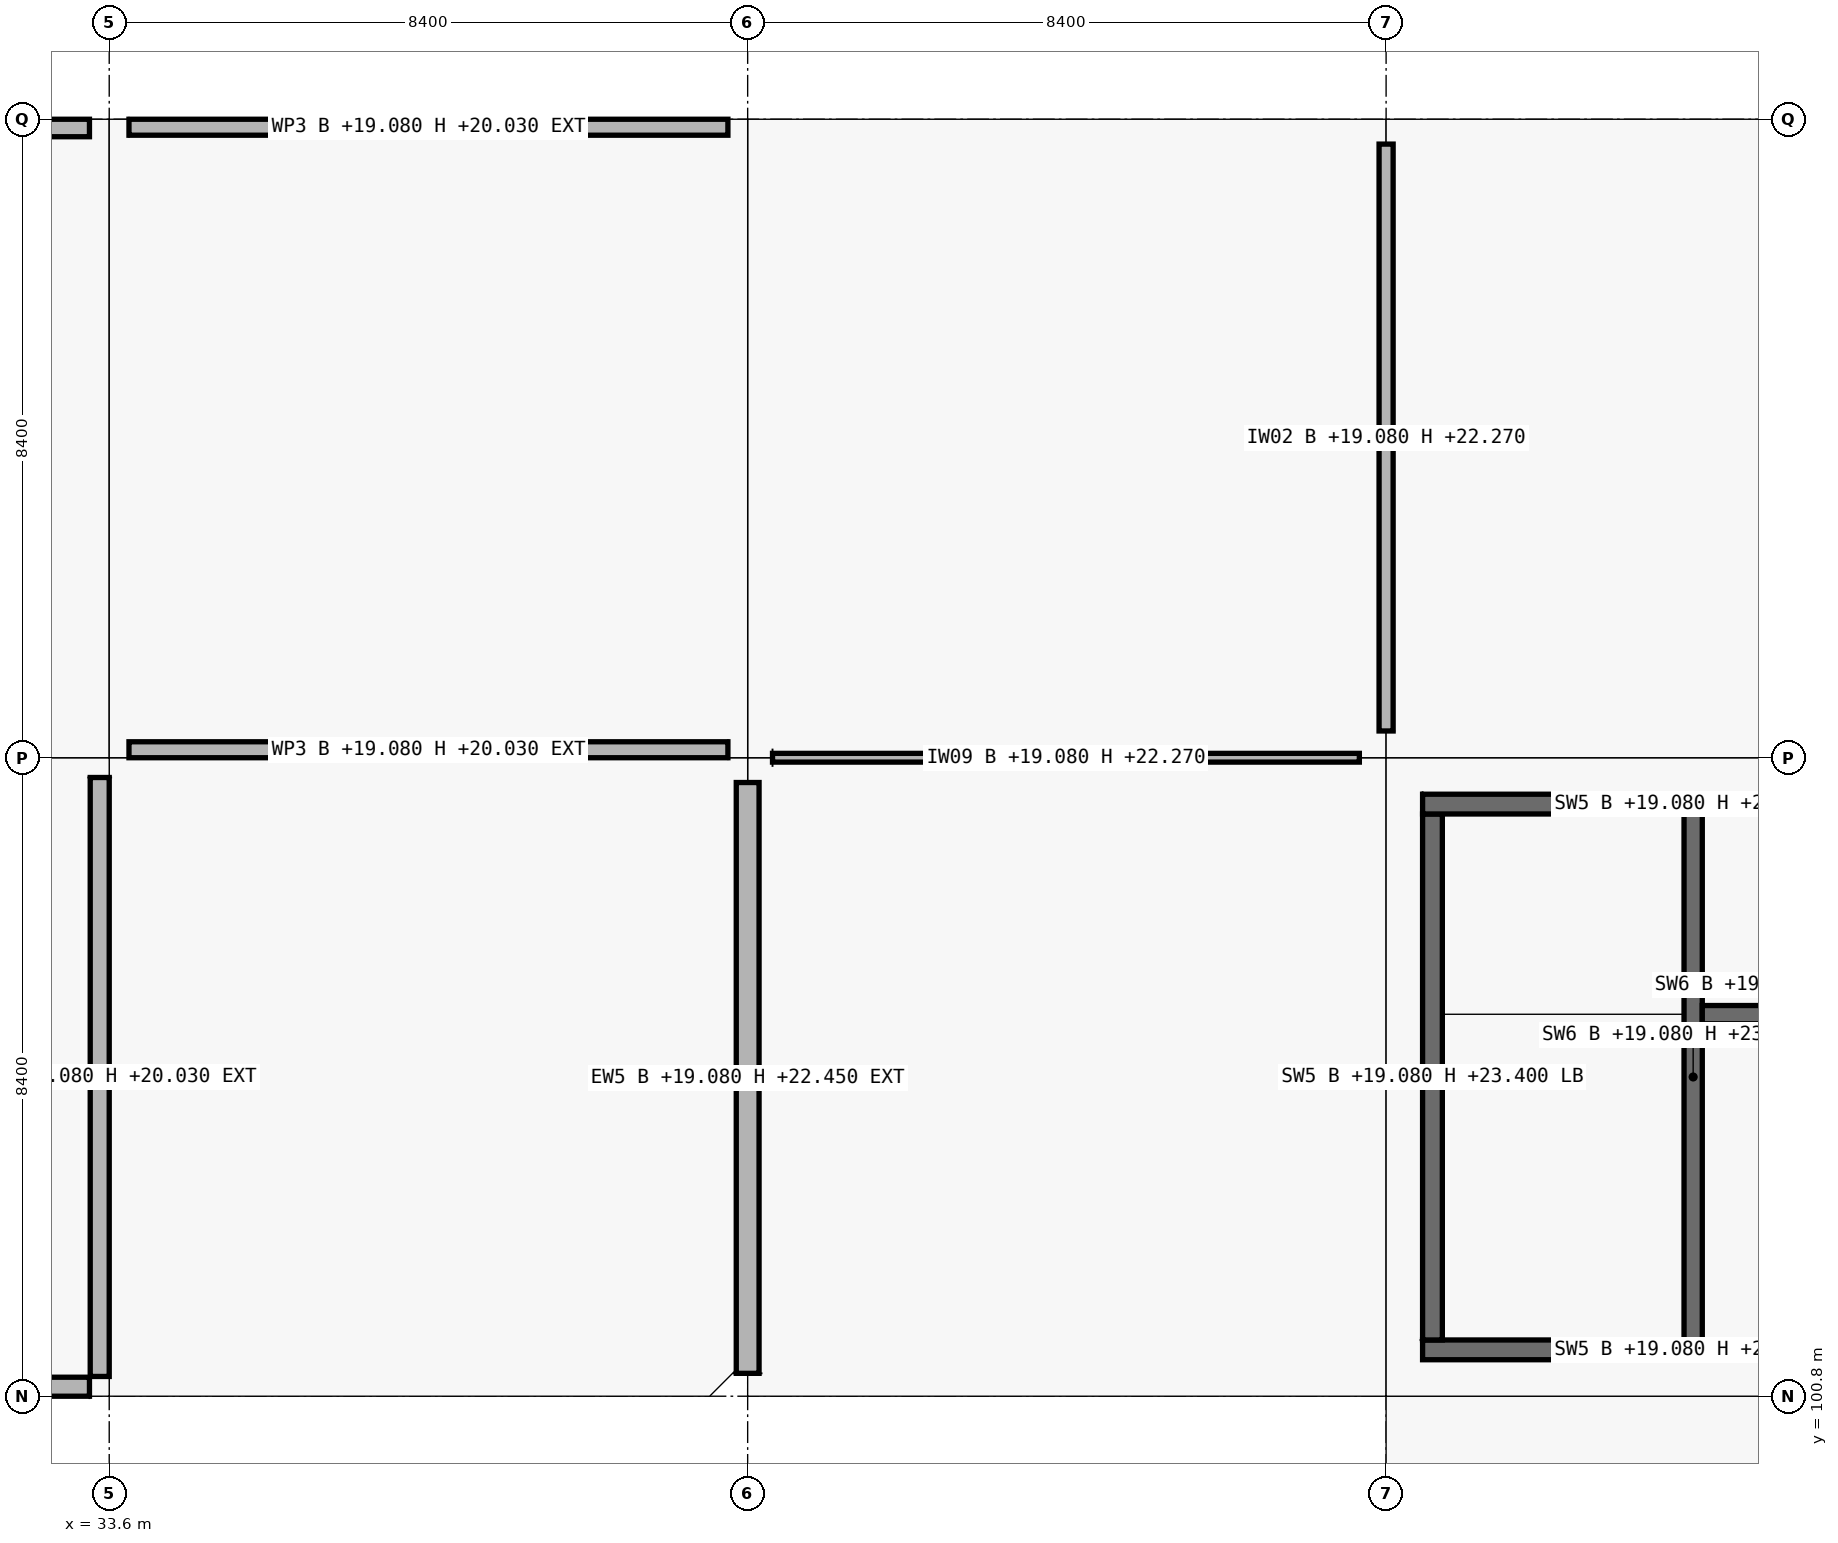
"""IFC4 building model, lengths in metres.
Left out: names, types, materials, properties, quantities, classifications, styles, units other than length and angle.
Written with IfcOpenShell. Run it as: python <this file> out.ifc"""

import sys

from ifc_helpers import new_model, si_unit, direction, frame, frame_2d, origin, origin_2d, place, context, subcontext, project, spatial, rectangle, extrude, element, fill, save


model = new_model("IFC4")
c1 = context("Model", 3, precision=1e-05, world=origin(), true_north=direction((0.0, 1.0)))
c2 = subcontext(c1, "Body", "Model", "MODEL_VIEW")
j1 = project(units=[si_unit("LENGTHUNIT", "METRE"), si_unit("PLANEANGLEUNIT", "RADIAN")], contexts=[c1])
p1 = place(None, origin())
s1 = spatial("IfcSite", under=j1, at=p1, CompositionType="ELEMENT")
p2 = place(p1, origin())
s2 = spatial("IfcBuilding", under=s1, at=p2, CompositionType="ELEMENT")
p3 = place(p2, frame((0.0, 0.0, 19.08)))
s3 = spatial("IfcBuildingStorey", under=s2, at=p3, CompositionType="ELEMENT", Elevation=19.08)
p4 = place(p3, frame((42.0, 100.8, 0.0), z_axis=(0.0, 0.0, 1.0), x_axis=(1.0, 0.0, 0.0)))
e1 = element("IfcColumn", 1, at=p4, inside=s3, PredefinedType="COLUMN", context=c2, shape_type="SweptSolid", body=[
    extrude(rectangle(XDim=0.6, YDim=0.6, at=origin_2d()), origin(), (0.0, 0.0, 1.0), 4.32),
])
p5 = place(p3, frame((42.0, 109.2, 0.0), z_axis=(0.0, 0.0, 1.0), x_axis=(1.0, 0.0, 0.0)))
e2 = element("IfcColumn", 2, at=p5, inside=s3, PredefinedType="COLUMN", context=c2, shape_type="SweptSolid", body=[
    extrude(rectangle(XDim=0.65, YDim=0.65, at=origin_2d()), origin(), (0.0, 0.0, 1.0), 4.32),
])
p6 = place(p3, frame((42.0, 117.6, 0.0), z_axis=(0.0, 0.0, 1.0), x_axis=(1.0, 0.0, 0.0)))
e3 = element("IfcColumn", 3, at=p6, inside=s3, PredefinedType="COLUMN", context=c2, shape_type="SweptSolid", body=[
    extrude(rectangle(XDim=0.6, YDim=0.6, at=origin_2d()), origin(), (0.0, 0.0, 1.0), 4.32),
])
p7 = place(p3, frame((50.4, 100.8, 0.0), z_axis=(0.0, 0.0, 1.0), x_axis=(1.0, 0.0, 0.0)))
e4 = element("IfcColumn", 4, at=p7, inside=s3, PredefinedType="COLUMN", context=c2, shape_type="SweptSolid", body=[
    extrude(rectangle(XDim=0.75, YDim=0.75, at=origin_2d()), origin(), (0.0, 0.0, 1.0), 4.32),
])
p8 = place(p3, frame((50.4, 109.2, 0.0), z_axis=(0.0, 0.0, 1.0), x_axis=(1.0, 0.0, 0.0)))
e5 = element("IfcColumn", 5, at=p8, inside=s3, PredefinedType="COLUMN", context=c2, shape_type="SweptSolid", body=[
    extrude(rectangle(XDim=0.7, YDim=0.7, at=origin_2d()), origin(), (0.0, 0.0, 1.0), 4.32),
])
p9 = place(p3, frame((50.4, 117.6, 0.0), z_axis=(0.0, 0.0, 1.0), x_axis=(1.0, 0.0, 0.0)))
e6 = element("IfcColumn", 6, at=p9, inside=s3, PredefinedType="COLUMN", context=c2, shape_type="SweptSolid", body=[
    extrude(rectangle(XDim=0.65, YDim=0.65, at=origin_2d()), origin(), (0.0, 0.0, 1.0), 4.32),
])
p10 = place(p3, frame((42.0, 101.101, 0.0), z_axis=(0.0, 0.0, 1.0), x_axis=(0.0, 1.0, 0.0)))
e7 = element("IfcWall", 7, at=p10, inside=s3, PredefinedType="SOLIDWALL", context=c2, shape_type="SweptSolid", body=[
    extrude(rectangle(XDim=7.773, YDim=0.3, at=frame_2d((3.886, 0.0))), origin(), (0.0, 0.0, 1.0), 3.37),
])
p11 = place(p10, frame((3.326, 0.0, 0.0)))
e8 = element("IfcOpeningElement", 8, at=p11, cuts=e7, PredefinedType="OPENING", context=c2, shape_type="SweptSolid", body=[
    extrude(rectangle(XDim=1.12, YDim=2.2, at=frame_2d((0.56, 1.1))), frame((0.0, 0.15, 0.0), z_axis=(0.0, -1.0, 0.0), x_axis=(1.0, 0.0, 0.0)), (0.0, 0.0, 1.0), 0.3),
])
p12 = place(p3, frame((33.34, 100.925, 0.0), z_axis=(0.0, 0.0, 1.0), x_axis=(-1.0, 0.0, 0.0)))
e9 = element("IfcWall", 9, at=p12, inside=s3, PredefinedType="PARAPET", context=c2, shape_type="SweptSolid", body=[
    extrude(rectangle(XDim=7.88, YDim=0.25, at=frame_2d((3.94, 0.0))), origin(), (0.0, 0.0, 1.0), 0.95),
])
p13 = place(p3, frame((33.475, 108.94, 0.0), z_axis=(0.0, 0.0, 1.0), x_axis=(0.0, -1.0, 0.0)))
e10 = element("IfcWall", 10, at=p13, inside=s3, PredefinedType="PARAPET", context=c2, shape_type="SweptSolid", body=[
    extrude(rectangle(XDim=7.88, YDim=0.25, at=frame_2d((3.94, 0.0))), origin(), (0.0, 0.0, 1.0), 0.95),
])
p14 = place(p3, frame((25.46, 117.485, 0.0), z_axis=(0.0, 0.0, 1.0), x_axis=(1.0, 0.0, 0.0)))
e11 = element("IfcWall", 11, at=p14, inside=s3, PredefinedType="PARAPET", context=c2, shape_type="SweptSolid", body=[
    extrude(rectangle(XDim=7.88, YDim=0.23, at=frame_2d((3.94, 0.0))), origin(), (0.0, 0.0, 1.0), 0.95),
])
for number, where, z_axis, x_axis in (
    (12, (41.74, 109.305, 0.0), (0.0, 0.0, 1.0), (-1.0, 0.0, 0.0)),
    (13, (33.86, 117.495, 0.0), (0.0, 0.0, 1.0), (1.0, 0.0, 0.0)),
):
    element("IfcWall", number, at=place(p3, frame(where, z_axis=z_axis, x_axis=x_axis)), inside=s3, PredefinedType="PARAPET", context=c2, shape_type="SweptSolid", body=[
        extrude(rectangle(XDim=7.88, YDim=0.21, at=frame_2d((3.94, 0.0))), origin(), (0.0, 0.0, 1.0), 0.95),
    ])
p15 = place(p3, frame((58.32, 101.41, 0.0), z_axis=(0.0, 0.0, 1.0), x_axis=(-1.0, 0.0, 0.0)))
e14 = element("IfcWall", 14, at=p15, inside=s3, PredefinedType="SHEAR", context=c2, shape_type="SweptSolid", body=[
    extrude(rectangle(XDim=7.44, YDim=0.26, at=frame_2d((3.72, 0.0))), origin(), (0.0, 0.0, 1.0), 4.32),
])
p16 = place(p15, frame((1.28, 0.0, 0.0)))
e15 = element("IfcOpeningElement", 15, at=p16, cuts=e14, PredefinedType="OPENING", context=c2, shape_type="SweptSolid", body=[
    extrude(rectangle(XDim=1.5, YDim=2.15, at=frame_2d((0.75, 1.075))), frame((0.0, 0.13, 0.0), z_axis=(0.0, -1.0, 0.0), x_axis=(1.0, 0.0, 0.0)), (0.0, 0.0, 1.0), 0.26),
])
p17 = place(p3, frame((51.01, 101.54, 0.0), z_axis=(0.0, 0.0, 1.0), x_axis=(0.0, 1.0, 0.0)))
e16 = element("IfcWall", 16, at=p17, inside=s3, PredefinedType="SHEAR", context=c2, shape_type="SweptSolid", body=[
    extrude(rectangle(XDim=6.92, YDim=0.26, at=frame_2d((3.46, 0.0))), origin(), (0.0, 0.0, 1.0), 4.32),
])
p18 = place(p3, frame((50.88, 108.59, 0.0), z_axis=(0.0, 0.0, 1.0), x_axis=(1.0, 0.0, 0.0)))
e17 = element("IfcWall", 17, at=p18, inside=s3, PredefinedType="SHEAR", context=c2, shape_type="SweptSolid", body=[
    extrude(rectangle(XDim=7.44, YDim=0.26, at=frame_2d((3.72, 0.0))), origin(), (0.0, 0.0, 1.0), 4.32),
])
p19 = place(p3, frame((54.44, 101.54, 0.0), z_axis=(0.0, 0.0, 1.0), x_axis=(0.0, 1.0, 0.0)))
e18 = element("IfcWall", 18, at=p19, inside=s3, PredefinedType="SHEAR", context=c2, shape_type="SweptSolid", body=[
    extrude(rectangle(XDim=6.92, YDim=0.24, at=frame_2d((3.46, 0.0))), origin(), (0.0, 0.0, 1.0), 4.32),
])
p20 = place(p19, frame((0.12, 0.0, 0.0)))
e19 = element("IfcOpeningElement", 19, at=p20, cuts=e18, PredefinedType="OPENING", context=c2, shape_type="SweptSolid", body=[
    extrude(rectangle(XDim=1.0, YDim=2.15, at=frame_2d((0.5, 1.075))), frame((0.0, 0.12, 0.0), z_axis=(0.0, -1.0, 0.0), x_axis=(1.0, 0.0, 0.0)), (0.0, 0.0, 1.0), 0.24),
])
p21 = place(p3, frame((54.56, 105.82, 0.0), z_axis=(0.0, 0.0, 1.0), x_axis=(1.0, 0.0, 0.0)))
e20 = element("IfcWall", 20, at=p21, inside=s3, PredefinedType="SHEAR", context=c2, shape_type="SweptSolid", body=[
    extrude(rectangle(XDim=3.5, YDim=0.24, at=frame_2d((1.75, 0.0))), origin(), (0.0, 0.0, 1.0), 4.32),
])
p22 = place(p21, frame((1.15, 0.0, 0.0)))
e21 = element("IfcOpeningElement", 21, at=p22, cuts=e20, PredefinedType="OPENING", context=c2, shape_type="SweptSolid", body=[
    extrude(rectangle(XDim=1.2, YDim=2.2, at=frame_2d((0.6, 1.1))), frame((0.0, 0.12, 0.0), z_axis=(0.0, -1.0, 0.0), x_axis=(1.0, 0.0, 0.0)), (0.0, 0.0, 1.0), 0.24),
])
p23 = place(p3, frame((42.327, 109.2, 0.0), z_axis=(0.0, 0.0, 1.0), x_axis=(1.0, 0.0, 0.0)))
e22 = element("IfcWall", 22, at=p23, inside=s3, PredefinedType="PARTITIONING", context=c2, shape_type="SweptSolid", body=[
    extrude(rectangle(XDim=7.721, YDim=0.115, at=frame_2d((3.861, 0.0))), origin(), (0.0, 0.0, 1.0), 3.19),
])
p24 = place(p23, frame((3.321, 0.0, 0.0)))
e23 = element("IfcOpeningElement", 23, at=p24, cuts=e22, PredefinedType="OPENING", context=c2, shape_type="SweptSolid", body=[
    extrude(rectangle(XDim=1.08, YDim=2.25, at=frame_2d((0.54, 1.125))), frame((0.0, 0.058, 0.0), z_axis=(0.0, -1.0, 0.0), x_axis=(1.0, 0.0, 0.0)), (0.0, 0.0, 1.0), 0.115),
])
p25 = place(p3, frame((50.4, 109.552, 0.0), z_axis=(0.0, 0.0, 1.0), x_axis=(0.0, 1.0, 0.0)))
e24 = element("IfcWall", 24, at=p25, inside=s3, PredefinedType="PARTITIONING", context=c2, shape_type="SweptSolid", body=[
    extrude(rectangle(XDim=7.721, YDim=0.185, at=frame_2d((3.86, 0.0))), origin(), (0.0, 0.0, 1.0), 3.19),
])
p26 = place(p25, frame((3.361, 0.0, 0.0)))
e25 = element("IfcOpeningElement", 25, at=p26, cuts=e24, PredefinedType="OPENING", context=c2, shape_type="SweptSolid", body=[
    extrude(rectangle(XDim=1.0, YDim=2.2, at=frame_2d((0.5, 1.1))), frame((0.0, 0.093, 0.0), z_axis=(0.0, -1.0, 0.0), x_axis=(1.0, 0.0, 0.0)), (0.0, 0.0, 1.0), 0.185),
])
p27 = place(p11, origin())
e26 = element("IfcDoor", 26, at=p27, inside=s3, OperationType="SINGLE_SWING_LEFT", PredefinedType="DOOR", context=c2, shape_type="SweptSolid", body=[
    extrude(rectangle(XDim=1.12, YDim=2.2, at=frame_2d((0.56, 1.1))), frame((0.0, 0.025, 0.0), z_axis=(0.0, -1.0, 0.0), x_axis=(1.0, 0.0, 0.0)), (0.0, 0.0, 1.0), 0.05),
])
fill(e8, e26)
p28 = place(p3, frame((0.0, 0.0, -0.25)))
p29 = place(p28, frame((37.8, 113.4, 0.0)))
p30 = place(p29, frame((0.0, 0.0, 0.2)))
e27 = element("IfcWindow", 27, at=p30, inside=s3, PartitioningType="SINGLE_PANEL", PredefinedType="SKYLIGHT", context=c2, shape_type="SweptSolid", body=[
    extrude(rectangle(XDim=2.4, YDim=1.4, at=origin_2d()), origin(), (0.0, 0.0, 1.0), 0.05),
])
p31 = place(p20, origin())
e28 = element("IfcDoor", 28, at=p31, inside=s3, OperationType="SINGLE_SWING_RIGHT", PredefinedType="DOOR", context=c2, shape_type="SweptSolid", body=[
    extrude(rectangle(XDim=1.0, YDim=2.15, at=frame_2d((0.5, 1.075))), frame((0.0, 0.025, 0.0), z_axis=(0.0, -1.0, 0.0), x_axis=(1.0, 0.0, 0.0)), (0.0, 0.0, 1.0), 0.05),
])
fill(e19, e28)
p32 = place(p24, origin())
e29 = element("IfcDoor", 29, at=p32, inside=s3, OperationType="SINGLE_SWING_LEFT", PredefinedType="DOOR", context=c2, shape_type="SweptSolid", body=[
    extrude(rectangle(XDim=1.08, YDim=2.25, at=frame_2d((0.54, 1.125))), frame((0.0, 0.025, 0.0), z_axis=(0.0, -1.0, 0.0), x_axis=(1.0, 0.0, 0.0)), (0.0, 0.0, 1.0), 0.05),
])
fill(e23, e29)
p33 = place(p26, origin())
e30 = element("IfcDoor", 30, at=p33, inside=s3, OperationType="SINGLE_SWING_LEFT", PredefinedType="DOOR", context=c2, shape_type="SweptSolid", body=[
    extrude(rectangle(XDim=1.0, YDim=2.2, at=frame_2d((0.5, 1.1))), frame((0.0, 0.025, 0.0), z_axis=(0.0, -1.0, 0.0), x_axis=(1.0, 0.0, 0.0)), (0.0, 0.0, 1.0), 0.05),
])
fill(e25, e30)
save(model, sys.argv[1])
